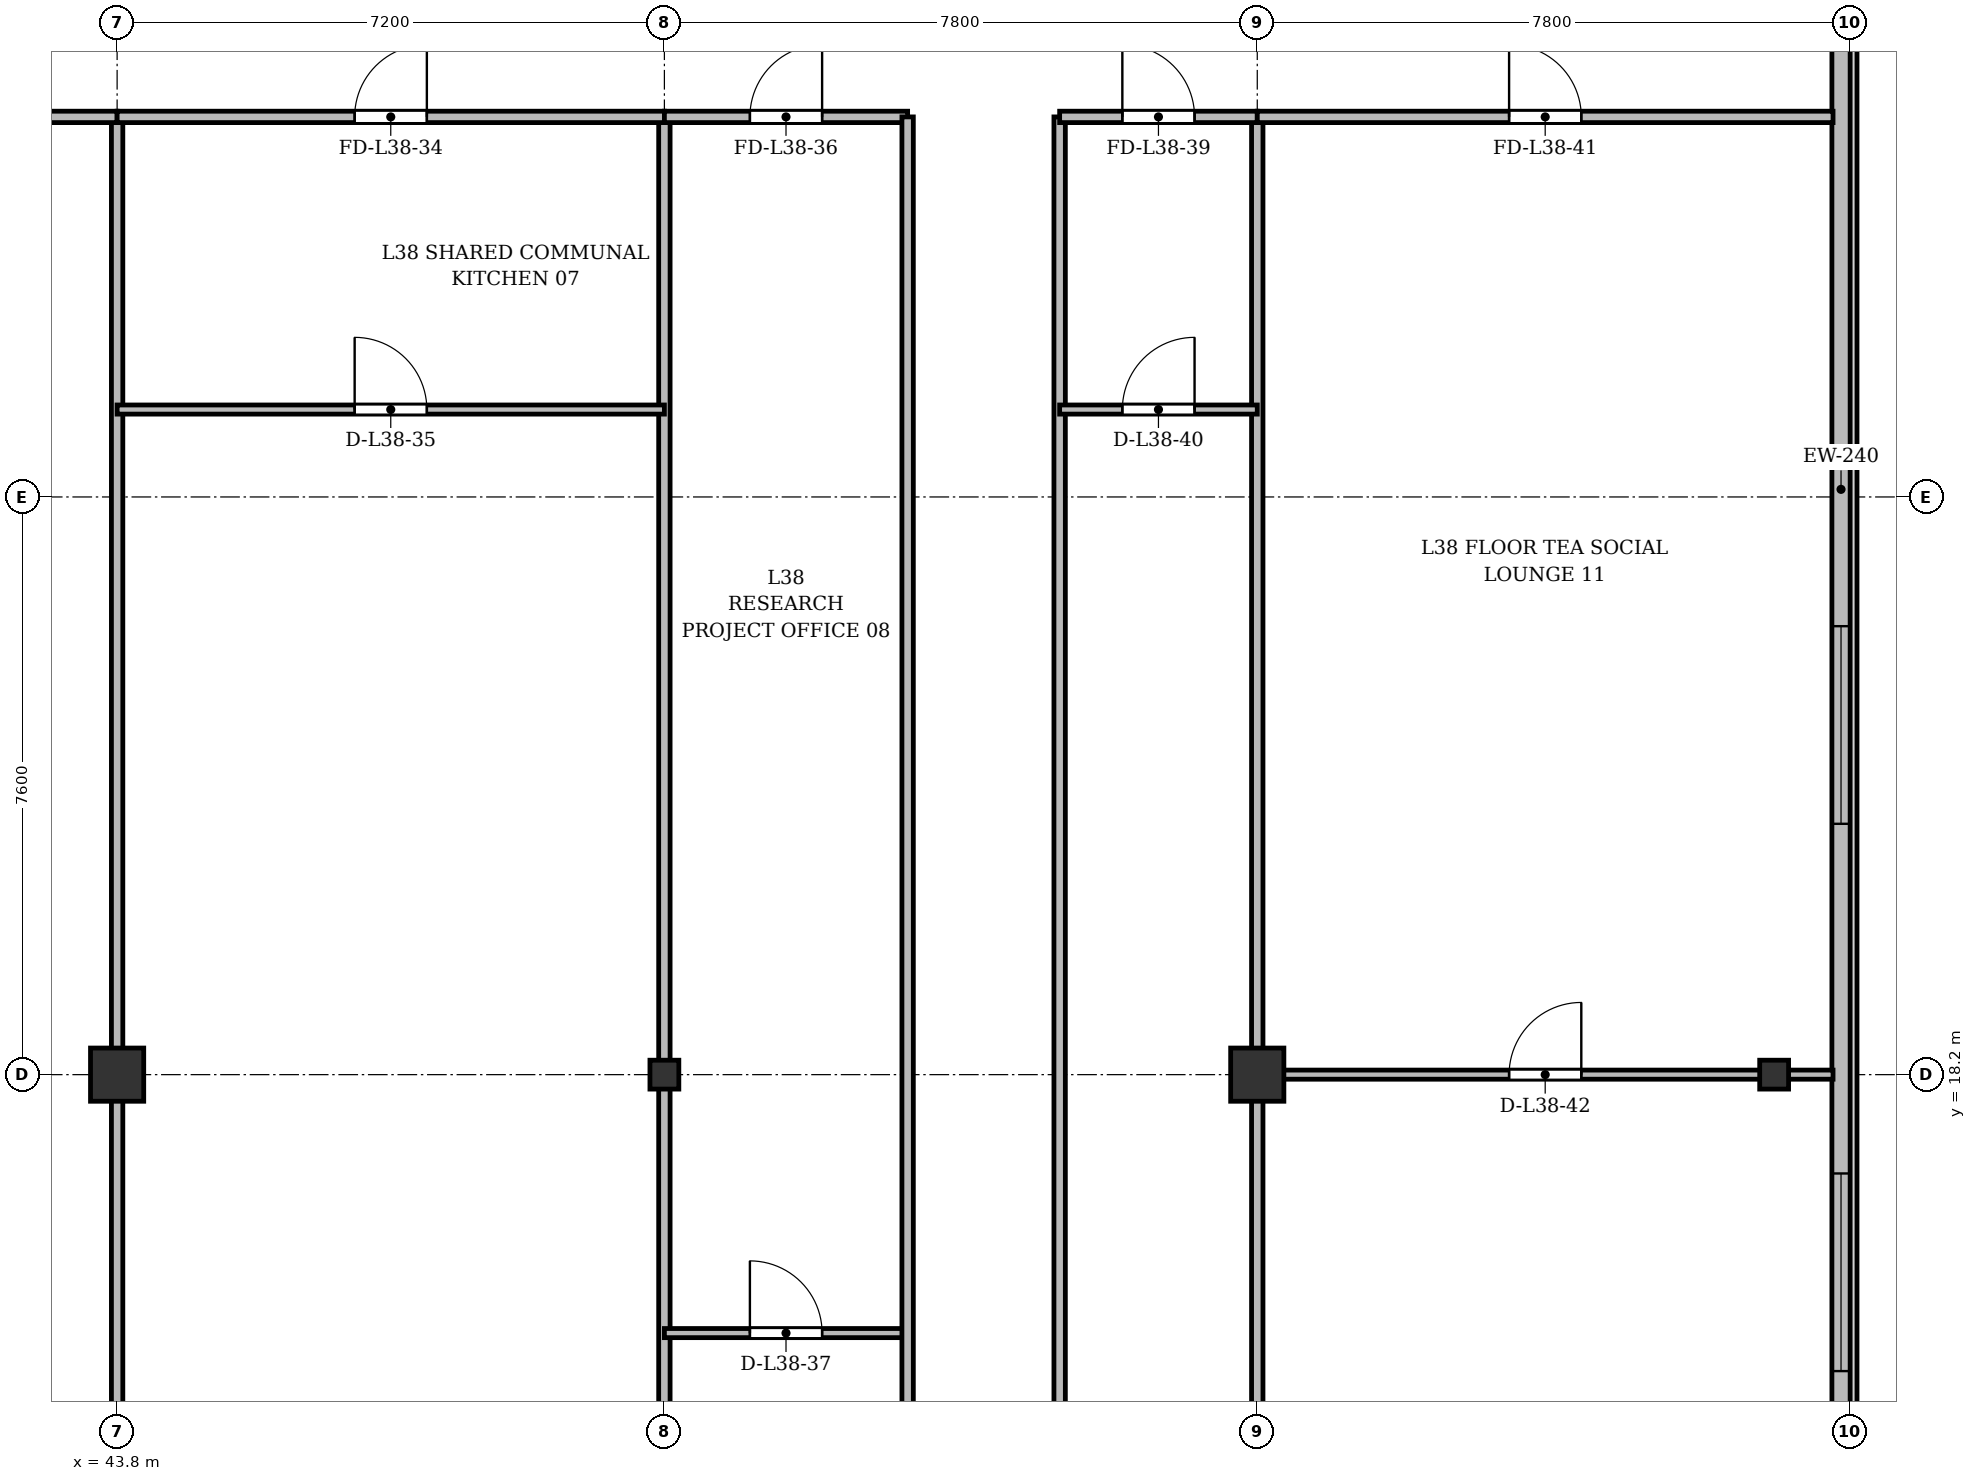
"""IFC4 building model, lengths in metres.
Left out: names, types, materials, properties, quantities, classifications, styles, units other than length and angle.
Written with IfcOpenShell. Run it as: python <this file> out.ifc"""

import sys

from ifc_helpers import new_model, si_unit, direction, frame, frame_2d, origin, origin_2d, place, context, subcontext, project, spatial, rectangle, i_section, extrude, source, transform, mapped, element, fill, save


model = new_model("IFC4")
c1 = context("Model", 3, precision=1e-05, world=origin(), true_north=direction((0.0, 1.0)))
c2 = subcontext(c1, "Body", "Model", "MODEL_VIEW")
j1 = project(units=[si_unit("LENGTHUNIT", "METRE"), si_unit("PLANEANGLEUNIT", "RADIAN")], contexts=[c1])
p1 = place(None, origin())
s1 = spatial("IfcSite", under=j1, at=p1, CompositionType="ELEMENT")
p2 = place(p1, origin())
s2 = spatial("IfcBuilding", under=s1, at=p2, CompositionType="ELEMENT")
p3 = place(p2, frame((0.0, 0.0, 146.5)))
s3 = spatial("IfcBuildingStorey", under=s2, at=p3, CompositionType="ELEMENT", Elevation=146.5)
m1 = source(origin(), c2, "Body", "SweptSolid", [
    extrude(rectangle(XDim=0.7, YDim=0.7, at=origin_2d()), origin(), (0.0, 0.0, 1.0), 3.6),
])
p4 = place(p3, frame((43.8, 18.2, 0.0), z_axis=(0.0, 0.0, 1.0), x_axis=(1.0, 0.0, 0.0)))
e1 = element("IfcColumn", 1, at=p4, inside=s3, PredefinedType="COLUMN", context=c2, shape_type="MappedRepresentation", body=[
    mapped(m1, transform((0.0, 0.0, 0.0), x_axis=(1.0, 0.0, 0.0), y_axis=(0.0, 1.0, 0.0), z_axis=(0.0, 0.0, 1.0), scale=1.0)),
])
m2 = source(origin(), c2, "Body", "SweptSolid", [
    extrude(i_section(OverallWidth=0.38, OverallDepth=0.38, WebThickness=0.02, FlangeThickness=0.03, at=origin_2d()), origin(), (0.0, 0.0, 1.0), 3.6),
])
p5 = place(p3, frame((51.0, 18.2, 0.0), z_axis=(0.0, 0.0, 1.0), x_axis=(1.0, 0.0, 0.0)))
e2 = element("IfcColumn", 2, at=p5, inside=s3, PredefinedType="COLUMN", context=c2, shape_type="MappedRepresentation", body=[
    mapped(m2, transform((0.0, 0.0, 0.0), x_axis=(1.0, 0.0, 0.0), y_axis=(0.0, 1.0, 0.0), z_axis=(0.0, 0.0, 1.0), scale=1.0)),
])
p6 = place(p3, frame((58.8, 18.2, 0.0), z_axis=(0.0, 0.0, 1.0), x_axis=(1.0, 0.0, 0.0)))
e3 = element("IfcColumn", 3, at=p6, inside=s3, PredefinedType="COLUMN", context=c2, shape_type="MappedRepresentation", body=[
    mapped(m1, transform((0.0, 0.0, 0.0), x_axis=(1.0, 0.0, 0.0), y_axis=(0.0, 1.0, 0.0), z_axis=(0.0, 0.0, 1.0), scale=1.0)),
])
p7 = place(p3, frame((65.6, 18.2, 0.0), z_axis=(0.0, 0.0, 1.0), x_axis=(1.0, 0.0, 0.0)))
e4 = element("IfcColumn", 4, at=p7, inside=s3, PredefinedType="COLUMN", context=c2, shape_type="MappedRepresentation", body=[
    mapped(m2, transform((0.0, 0.0, 0.0), x_axis=(1.0, 0.0, 0.0), y_axis=(0.0, 1.0, 0.0), z_axis=(0.0, 0.0, 1.0), scale=1.0)),
])
p8 = place(p3, frame((66.48, 45.5, 0.0), z_axis=(0.0, 0.0, 1.0), x_axis=(0.0, -1.0, 0.0)))
e5 = element("IfcWall", 5, at=p8, inside=s3, PredefinedType="SOLIDWALL", context=c2, shape_type="SweptSolid", body=[
    extrude(rectangle(XDim=39.2, YDim=0.24, at=frame_2d((19.6, 0.0))), origin(), (0.0, 0.0, 1.0), 3.35),
])
p9 = place(p8, frame((36.55, 0.0, 0.92)))
e6 = element("IfcOpeningElement", 6, at=p9, cuts=e5, PredefinedType="OPENING", context=c2, shape_type="SweptSolid", body=[
    extrude(rectangle(XDim=1.2, YDim=1.65, at=frame_2d((0.6, 0.825))), frame((0.0, 0.13, 0.0), z_axis=(0.0, -1.0, 0.0), x_axis=(1.0, 0.0, 0.0)), (0.0, 0.0, 1.0), 0.26),
])
p10 = place(p8, frame((32.8, 0.0, 0.92)))
e7 = element("IfcOpeningElement", 7, at=p10, cuts=e5, PredefinedType="OPENING", context=c2, shape_type="SweptSolid", body=[
    extrude(rectangle(XDim=2.6, YDim=1.9, at=frame_2d((1.3, 0.95))), frame((0.0, 0.13, 0.0), z_axis=(0.0, -1.0, 0.0), x_axis=(1.0, 0.0, 0.0)), (0.0, 0.0, 1.0), 0.26),
])
p11 = place(p8, frame((28.6, 0.0, 0.92)))
e8 = element("IfcOpeningElement", 8, at=p11, cuts=e5, PredefinedType="OPENING", context=c2, shape_type="SweptSolid", body=[
    extrude(rectangle(XDim=2.6, YDim=1.9, at=frame_2d((1.3, 0.95))), frame((0.0, 0.13, 0.0), z_axis=(0.0, -1.0, 0.0), x_axis=(1.0, 0.0, 0.0)), (0.0, 0.0, 1.0), 0.26),
])
p12 = place(p8, frame((21.4, 0.0, 0.92)))
e9 = element("IfcOpeningElement", 9, at=p12, cuts=e5, PredefinedType="OPENING", context=c2, shape_type="SweptSolid", body=[
    extrude(rectangle(XDim=2.6, YDim=1.9, at=frame_2d((1.3, 0.95))), frame((0.0, 0.13, 0.0), z_axis=(0.0, -1.0, 0.0), x_axis=(1.0, 0.0, 0.0)), (0.0, 0.0, 1.0), 0.26),
])
p13 = place(p8, frame((7.4, 0.0, 0.92)))
e10 = element("IfcOpeningElement", 10, at=p13, cuts=e5, PredefinedType="OPENING", context=c2, shape_type="SweptSolid", body=[
    extrude(rectangle(XDim=2.6, YDim=1.9, at=frame_2d((1.3, 0.95))), frame((0.0, 0.13, 0.0), z_axis=(0.0, -1.0, 0.0), x_axis=(1.0, 0.0, 0.0)), (0.0, 0.0, 1.0), 0.26),
])
p14 = place(p8, frame((4.5, 0.0, 0.92)))
e11 = element("IfcOpeningElement", 11, at=p14, cuts=e5, PredefinedType="OPENING", context=c2, shape_type="SweptSolid", body=[
    extrude(rectangle(XDim=1.2, YDim=1.65, at=frame_2d((0.6, 0.825))), frame((0.0, 0.13, 0.0), z_axis=(0.0, -1.0, 0.0), x_axis=(1.0, 0.0, 0.0)), (0.0, 0.0, 1.0), 0.26),
])
p15 = place(p8, frame((1.15, 0.0, 0.92)))
e12 = element("IfcOpeningElement", 12, at=p15, cuts=e5, PredefinedType="OPENING", context=c2, shape_type="SweptSolid", body=[
    extrude(rectangle(XDim=1.2, YDim=1.65, at=frame_2d((0.6, 0.825))), frame((0.0, 0.13, 0.0), z_axis=(0.0, -1.0, 0.0), x_axis=(1.0, 0.0, 0.0)), (0.0, 0.0, 1.0), 0.26),
])
for number, where, z_axis, x_axis in (
    (13, (43.8, 3.525, 0.0), (0.0, 0.0, 1.0), (0.0, 1.0, 0.0)),
    (14, (51.0, 3.525, 0.0), (0.0, 0.0, 1.0), (0.0, 1.0, 0.0)),
    (15, (58.8, 3.525, 0.0), (0.0, 0.0, 1.0), (0.0, 1.0, 0.0)),
):
    element("IfcWall", number, at=place(p3, frame(where, z_axis=z_axis, x_axis=x_axis)), inside=s3, PredefinedType="PARTITIONING", context=c2, shape_type="SweptSolid", body=[
        extrude(rectangle(XDim=27.275, YDim=0.15, at=frame_2d((13.638, 0.0))), origin(), (0.0, 0.0, 1.0), 2.85),
    ])
p16 = place(p3, frame((30.6, 30.8, 0.0), z_axis=(0.0, 0.0, 1.0), x_axis=(1.0, 0.0, 0.0)))
e16 = element("IfcWall", 16, at=p16, inside=s3, PredefinedType="PARTITIONING", context=c2, shape_type="SweptSolid", body=[
    extrude(rectangle(XDim=13.2, YDim=0.15, at=frame_2d((6.6, 0.0))), origin(), (0.0, 0.0, 1.0), 2.85),
])
p17 = place(p16, frame((5.8, 0.0, 0.0)))
e17 = element("IfcOpeningElement", 17, at=p17, cuts=e16, PredefinedType="OPENING", context=c2, shape_type="SweptSolid", body=[
    extrude(rectangle(XDim=1.6, YDim=2.2, at=frame_2d((0.8, 1.1))), frame((0.0, 0.085, 0.0), z_axis=(0.0, -1.0, 0.0), x_axis=(1.0, 0.0, 0.0)), (0.0, 0.0, 1.0), 0.17),
])
p18 = place(p3, frame((43.8, 30.8, 0.0), z_axis=(0.0, 0.0, 1.0), x_axis=(1.0, 0.0, 0.0)))
e18 = element("IfcWall", 18, at=p18, inside=s3, PredefinedType="PARTITIONING", context=c2, shape_type="SweptSolid", body=[
    extrude(rectangle(XDim=7.2, YDim=0.15, at=frame_2d((3.6, 0.0))), origin(), (0.0, 0.0, 1.0), 2.85),
])
p19 = place(p18, frame((3.125, 0.0, 0.0)))
e19 = element("IfcOpeningElement", 19, at=p19, cuts=e18, PredefinedType="OPENING", context=c2, shape_type="SweptSolid", body=[
    extrude(rectangle(XDim=0.95, YDim=2.15, at=frame_2d((0.475, 1.075))), frame((0.0, 0.085, 0.0), z_axis=(0.0, -1.0, 0.0), x_axis=(1.0, 0.0, 0.0)), (0.0, 0.0, 1.0), 0.17),
])
p20 = place(p3, frame((43.8, 26.95, 0.0), z_axis=(0.0, 0.0, 1.0), x_axis=(1.0, 0.0, 0.0)))
e20 = element("IfcWall", 20, at=p20, inside=s3, PredefinedType="PARTITIONING", context=c2, shape_type="SweptSolid", body=[
    extrude(rectangle(XDim=7.2, YDim=0.12, at=frame_2d((3.6, 0.0))), origin(), (0.0, 0.0, 1.0), 2.85),
])
p21 = place(p20, frame((3.125, 0.0, 0.0)))
e21 = element("IfcOpeningElement", 21, at=p21, cuts=e20, PredefinedType="OPENING", context=c2, shape_type="SweptSolid", body=[
    extrude(rectangle(XDim=0.95, YDim=2.15, at=frame_2d((0.475, 1.075))), frame((0.0, 0.07, 0.0), z_axis=(0.0, -1.0, 0.0), x_axis=(1.0, 0.0, 0.0)), (0.0, 0.0, 1.0), 0.14),
])
p22 = place(p3, frame((51.0, 30.8, 0.0), z_axis=(0.0, 0.0, 1.0), x_axis=(1.0, 0.0, 0.0)))
e22 = element("IfcWall", 22, at=p22, inside=s3, PredefinedType="PARTITIONING", context=c2, shape_type="SweptSolid", body=[
    extrude(rectangle(XDim=3.2, YDim=0.15, at=frame_2d((1.6, 0.0))), origin(), (0.0, 0.0, 1.0), 2.85),
])
p23 = place(p22, frame((1.125, 0.0, 0.0)))
e23 = element("IfcOpeningElement", 23, at=p23, cuts=e22, PredefinedType="OPENING", context=c2, shape_type="SweptSolid", body=[
    extrude(rectangle(XDim=0.95, YDim=2.15, at=frame_2d((0.475, 1.075))), frame((0.0, 0.085, 0.0), z_axis=(0.0, -1.0, 0.0), x_axis=(1.0, 0.0, 0.0)), (0.0, 0.0, 1.0), 0.17),
])
p24 = place(p3, frame((51.0, 14.8, 0.0), z_axis=(0.0, 0.0, 1.0), x_axis=(1.0, 0.0, 0.0)))
e24 = element("IfcWall", 24, at=p24, inside=s3, PredefinedType="PARTITIONING", context=c2, shape_type="SweptSolid", body=[
    extrude(rectangle(XDim=3.2, YDim=0.12, at=frame_2d((1.6, 0.0))), origin(), (0.0, 0.0, 1.0), 2.85),
])
p25 = place(p24, frame((1.125, 0.0, 0.0)))
e25 = element("IfcOpeningElement", 25, at=p25, cuts=e24, PredefinedType="OPENING", context=c2, shape_type="SweptSolid", body=[
    extrude(rectangle(XDim=0.95, YDim=2.15, at=frame_2d((0.475, 1.075))), frame((0.0, 0.07, 0.0), z_axis=(0.0, -1.0, 0.0), x_axis=(1.0, 0.0, 0.0)), (0.0, 0.0, 1.0), 0.14),
])
for number, where, z_axis, x_axis in (
    (26, (54.2, 3.525, 0.0), (0.0, 0.0, 1.0), (0.0, 1.0, 0.0)),
    (27, (56.2, 3.525, 0.0), (0.0, 0.0, 1.0), (0.0, 1.0, 0.0)),
):
    element("IfcWall", number, at=place(p3, frame(where, z_axis=z_axis, x_axis=x_axis)), inside=s3, PredefinedType="PARTITIONING", context=c2, shape_type="SweptSolid", body=[
        extrude(rectangle(XDim=27.275, YDim=0.15, at=frame_2d((13.638, 0.0))), origin(), (0.0, 0.0, 1.0), 2.75),
    ])
p26 = place(p3, frame((56.2, 30.8, 0.0), z_axis=(0.0, 0.0, 1.0), x_axis=(1.0, 0.0, 0.0)))
e28 = element("IfcWall", 28, at=p26, inside=s3, PredefinedType="PARTITIONING", context=c2, shape_type="SweptSolid", body=[
    extrude(rectangle(XDim=2.6, YDim=0.15, at=frame_2d((1.3, 0.0))), origin(), (0.0, 0.0, 1.0), 2.85),
])
p27 = place(p26, frame((0.825, 0.0, 0.0)))
e29 = element("IfcOpeningElement", 29, at=p27, cuts=e28, PredefinedType="OPENING", context=c2, shape_type="SweptSolid", body=[
    extrude(rectangle(XDim=0.95, YDim=2.15, at=frame_2d((0.475, 1.075))), frame((0.0, 0.085, 0.0), z_axis=(0.0, -1.0, 0.0), x_axis=(1.0, 0.0, 0.0)), (0.0, 0.0, 1.0), 0.17),
])
p28 = place(p3, frame((56.2, 26.95, 0.0), z_axis=(0.0, 0.0, 1.0), x_axis=(1.0, 0.0, 0.0)))
e30 = element("IfcWall", 30, at=p28, inside=s3, PredefinedType="PARTITIONING", context=c2, shape_type="SweptSolid", body=[
    extrude(rectangle(XDim=2.6, YDim=0.12, at=frame_2d((1.3, 0.0))), origin(), (0.0, 0.0, 1.0), 2.85),
])
p29 = place(p28, frame((0.825, 0.0, 0.0)))
e31 = element("IfcOpeningElement", 31, at=p29, cuts=e30, PredefinedType="OPENING", context=c2, shape_type="SweptSolid", body=[
    extrude(rectangle(XDim=0.95, YDim=2.15, at=frame_2d((0.475, 1.075))), frame((0.0, 0.07, 0.0), z_axis=(0.0, -1.0, 0.0), x_axis=(1.0, 0.0, 0.0)), (0.0, 0.0, 1.0), 0.14),
])
p30 = place(p3, frame((58.8, 30.8, 0.0), z_axis=(0.0, 0.0, 1.0), x_axis=(1.0, 0.0, 0.0)))
e32 = element("IfcWall", 32, at=p30, inside=s3, PredefinedType="PARTITIONING", context=c2, shape_type="SweptSolid", body=[
    extrude(rectangle(XDim=7.575, YDim=0.15, at=frame_2d((3.788, 0.0))), origin(), (0.0, 0.0, 1.0), 2.85),
])
p31 = place(p30, frame((3.313, 0.0, 0.0)))
e33 = element("IfcOpeningElement", 33, at=p31, cuts=e32, PredefinedType="OPENING", context=c2, shape_type="SweptSolid", body=[
    extrude(rectangle(XDim=0.95, YDim=2.15, at=frame_2d((0.475, 1.075))), frame((0.0, 0.085, 0.0), z_axis=(0.0, -1.0, 0.0), x_axis=(1.0, 0.0, 0.0)), (0.0, 0.0, 1.0), 0.17),
])
p32 = place(p3, frame((58.8, 18.2, 0.0), z_axis=(0.0, 0.0, 1.0), x_axis=(1.0, 0.0, 0.0)))
e34 = element("IfcWall", 34, at=p32, inside=s3, PredefinedType="PARTITIONING", context=c2, shape_type="SweptSolid", body=[
    extrude(rectangle(XDim=7.575, YDim=0.12, at=frame_2d((3.788, 0.0))), origin(), (0.0, 0.0, 1.0), 2.75),
])
p33 = place(p32, frame((3.313, 0.0, 0.0)))
e35 = element("IfcOpeningElement", 35, at=p33, cuts=e34, PredefinedType="OPENING", context=c2, shape_type="SweptSolid", body=[
    extrude(rectangle(XDim=0.95, YDim=2.15, at=frame_2d((0.475, 1.075))), frame((0.0, 0.07, 0.0), z_axis=(0.0, -1.0, 0.0), x_axis=(1.0, 0.0, 0.0)), (0.0, 0.0, 1.0), 0.14),
])
m3 = source(origin(), c2, "Body", "SweptSolid", [
    extrude(rectangle(XDim=2.6, YDim=1.9, at=frame_2d((1.3, 0.95))), frame((0.0, 0.03, 0.0), z_axis=(0.0, -1.0, 0.0), x_axis=(1.0, 0.0, 0.0)), (0.0, 0.0, 1.0), 0.06),
])
p34 = place(p11, origin())
e36 = element("IfcWindow", 36, at=p34, inside=s3, PartitioningType="SINGLE_PANEL", PredefinedType="WINDOW", context=c2, shape_type="MappedRepresentation", body=[
    mapped(m3, transform((0.0, 0.0, 0.0), x_axis=(1.0, 0.0, 0.0), y_axis=(0.0, 1.0, 0.0), z_axis=(0.0, 0.0, 1.0), scale=1.0)),
])
fill(e8, e36)
p35 = place(p12, origin())
e37 = element("IfcWindow", 37, at=p35, inside=s3, PartitioningType="SINGLE_PANEL", PredefinedType="WINDOW", context=c2, shape_type="MappedRepresentation", body=[
    mapped(m3, transform((0.0, 0.0, 0.0), x_axis=(1.0, 0.0, 0.0), y_axis=(0.0, 1.0, 0.0), z_axis=(0.0, 0.0, 1.0), scale=1.0)),
])
fill(e9, e37)
m4 = source(origin(), c2, "Body", "SweptSolid", [
    extrude(rectangle(XDim=0.95, YDim=2.15, at=frame_2d((0.475, 1.075))), frame((0.0, 0.025, 0.0), z_axis=(0.0, -1.0, 0.0), x_axis=(1.0, 0.0, 0.0)), (0.0, 0.0, 1.0), 0.05),
])
p36 = place(p19, origin())
e38 = element("IfcDoor", 38, at=p36, inside=s3, OperationType="SINGLE_SWING_RIGHT", PredefinedType="DOOR", context=c2, shape_type="MappedRepresentation", body=[
    mapped(m4, transform((0.0, 0.0, 0.0), x_axis=(1.0, 0.0, 0.0), y_axis=(0.0, 1.0, 0.0), z_axis=(0.0, 0.0, 1.0), scale=1.0)),
])
fill(e19, e38)
p37 = place(p21, origin())
e39 = element("IfcDoor", 39, at=p37, inside=s3, OperationType="SINGLE_SWING_LEFT", PredefinedType="DOOR", context=c2, shape_type="MappedRepresentation", body=[
    mapped(m4, transform((0.0, 0.0, 0.0), x_axis=(1.0, 0.0, 0.0), y_axis=(0.0, 1.0, 0.0), z_axis=(0.0, 0.0, 1.0), scale=1.0)),
])
fill(e21, e39)
p38 = place(p23, origin())
e40 = element("IfcDoor", 40, at=p38, inside=s3, OperationType="SINGLE_SWING_RIGHT", PredefinedType="DOOR", context=c2, shape_type="MappedRepresentation", body=[
    mapped(m4, transform((0.0, 0.0, 0.0), x_axis=(1.0, 0.0, 0.0), y_axis=(0.0, 1.0, 0.0), z_axis=(0.0, 0.0, 1.0), scale=1.0)),
])
fill(e23, e40)
p39 = place(p25, origin())
e41 = element("IfcDoor", 41, at=p39, inside=s3, OperationType="SINGLE_SWING_LEFT", PredefinedType="DOOR", context=c2, shape_type="MappedRepresentation", body=[
    mapped(m4, transform((0.0, 0.0, 0.0), x_axis=(1.0, 0.0, 0.0), y_axis=(0.0, 1.0, 0.0), z_axis=(0.0, 0.0, 1.0), scale=1.0)),
])
fill(e25, e41)
p40 = place(p27, origin())
e42 = element("IfcDoor", 42, at=p40, inside=s3, OperationType="SINGLE_SWING_LEFT", PredefinedType="DOOR", context=c2, shape_type="MappedRepresentation", body=[
    mapped(m4, transform((0.0, 0.0, 0.0), x_axis=(1.0, 0.0, 0.0), y_axis=(0.0, 1.0, 0.0), z_axis=(0.0, 0.0, 1.0), scale=1.0)),
])
fill(e29, e42)
p41 = place(p29, origin())
e43 = element("IfcDoor", 43, at=p41, inside=s3, OperationType="SINGLE_SWING_RIGHT", PredefinedType="DOOR", context=c2, shape_type="MappedRepresentation", body=[
    mapped(m4, transform((0.0, 0.0, 0.0), x_axis=(1.0, 0.0, 0.0), y_axis=(0.0, 1.0, 0.0), z_axis=(0.0, 0.0, 1.0), scale=1.0)),
])
fill(e31, e43)
p42 = place(p31, origin())
e44 = element("IfcDoor", 44, at=p42, inside=s3, OperationType="SINGLE_SWING_LEFT", PredefinedType="DOOR", context=c2, shape_type="MappedRepresentation", body=[
    mapped(m4, transform((0.0, 0.0, 0.0), x_axis=(1.0, 0.0, 0.0), y_axis=(0.0, 1.0, 0.0), z_axis=(0.0, 0.0, 1.0), scale=1.0)),
])
fill(e33, e44)
p43 = place(p33, origin())
e45 = element("IfcDoor", 45, at=p43, inside=s3, OperationType="SINGLE_SWING_RIGHT", PredefinedType="DOOR", context=c2, shape_type="MappedRepresentation", body=[
    mapped(m4, transform((0.0, 0.0, 0.0), x_axis=(1.0, 0.0, 0.0), y_axis=(0.0, 1.0, 0.0), z_axis=(0.0, 0.0, 1.0), scale=1.0)),
])
fill(e35, e45)
save(model, sys.argv[1])
